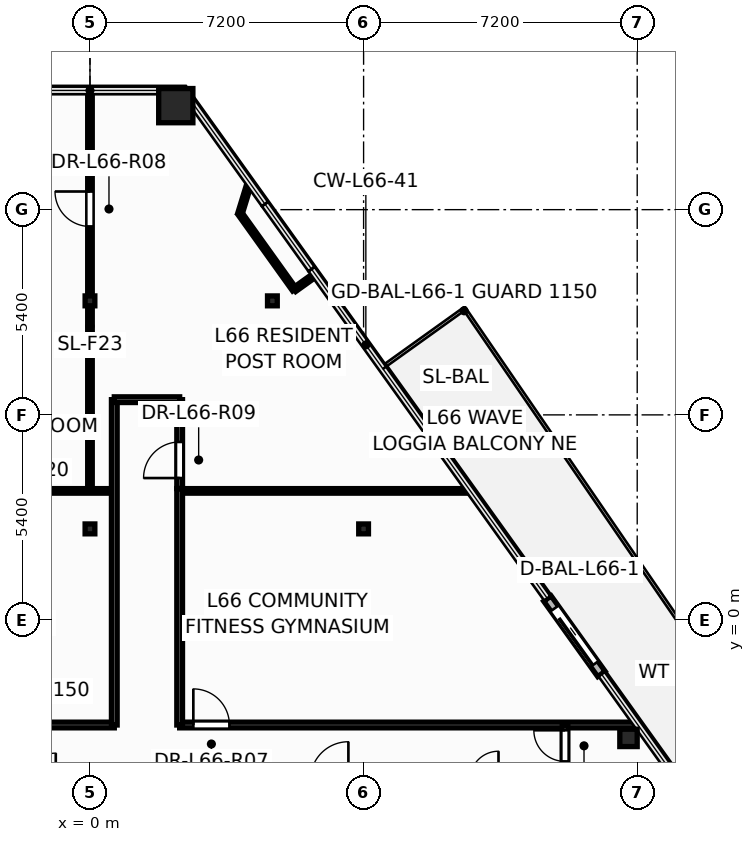
"""IFC4 building model, lengths in metres.
Left out: names, types, materials, properties, quantities, classifications, styles, units other than length and angle.
Written with IfcOpenShell. Run it as: python <this file> out.ifc"""

import sys

from ifc_helpers import new_model, si_unit, direction, frame, frame_2d, origin, origin_2d, place, context, subcontext, project, spatial, rectangle, hollow_rectangle, hollow_circle, i_section, extrude, element, fill, save


model = new_model("IFC4")
c1 = context("Model", 3, precision=1e-05, world=origin(), true_north=direction((0.0, 1.0)))
c2 = subcontext(c1, "Body", "Model", "MODEL_VIEW")
j1 = project(units=[si_unit("LENGTHUNIT", "METRE"), si_unit("PLANEANGLEUNIT", "RADIAN")], contexts=[c1])
p1 = place(None, origin())
s1 = spatial("IfcSite", under=j1, at=p1, CompositionType="ELEMENT")
p2 = place(p1, origin())
s2 = spatial("IfcBuilding", under=s1, at=p2, CompositionType="ELEMENT")
p3 = place(p2, frame((0.0, 0.0, 252.6)))
s3 = spatial("IfcBuildingStorey", under=s2, at=p3, CompositionType="ELEMENT", Elevation=252.6)
p4 = place(p3, frame((2.258, 13.537, 0.0), z_axis=(0.0, 0.0, 1.0), x_axis=(1.0, 0.0, 0.0)))
e1 = element("IfcColumn", 1, at=p4, inside=s3, PredefinedType="COLUMN", context=c2, shape_type="SweptSolid", body=[
    extrude(hollow_rectangle(XDim=0.9, YDim=0.9, WallThickness=0.04, at=origin_2d()), origin(), (0.0, 0.0, 1.0), 3.6),
])
for number, where, z_axis, x_axis in (
    (2, (14.171, -3.099, 0.0), (0.0, 0.0, 1.0), (1.0, 0.0, 0.0)),
    (3, (8.673, 4.579, 0.0), (0.0, 0.0, 1.0), (1.0, 0.0, 0.0)),
):
    element("IfcColumn", number, at=place(p3, frame(where, z_axis=z_axis, x_axis=x_axis)), inside=s3, PredefinedType="COLUMN", context=c2, shape_type="SweptSolid", body=[
        extrude(hollow_circle(Radius=0.229, WallThickness=0.016, at=origin_2d()), origin(), (0.0, 0.0, 1.0), 3.6),
    ])
for number, where, z_axis, x_axis in (
    (4, (0.0, 2.4, 0.0), (0.0, 0.0, 1.0), (1.0, 0.0, 0.0)),
    (5, (7.2, 2.4, 0.0), (0.0, 0.0, 1.0), (1.0, 0.0, 0.0)),
    (6, (0.0, 8.4, 0.0), (0.0, 0.0, 1.0), (1.0, 0.0, 0.0)),
    (7, (4.8, 8.4, 0.0), (0.0, 0.0, 1.0), (1.0, 0.0, 0.0)),
):
    element("IfcColumn", number, at=place(p3, frame(where, z_axis=z_axis, x_axis=x_axis)), inside=s3, PredefinedType="COLUMN", context=c2, shape_type="SweptSolid", body=[
        extrude(i_section(OverallWidth=0.256, OverallDepth=0.26, WebThickness=0.01, FlangeThickness=0.017, at=origin_2d()), origin(), (0.0, 0.0, 1.0), 3.6),
    ])
p5 = place(p3, frame((13.458, -1.417, -0.015), z_axis=(0.0, 0.0, 1.0), x_axis=(-0.582146480264, 0.813083928949, 0.0)))
e8 = element("IfcWall", 8, at=p5, inside=s3, PredefinedType="STANDARD", context=c2, shape_type="SweptSolid", body=[
    extrude(rectangle(XDim=2.44, YDim=0.24, at=frame_2d((1.22, 0.0))), origin(), (0.0, 0.0, 1.0), 2.878),
])
p6 = place(p5, frame((0.32, 0.0, 0.015)))
e9 = element("IfcOpeningElement", 9, at=p6, cuts=e8, PredefinedType="OPENING", context=c2, shape_type="SweptSolid", body=[
    extrude(rectangle(XDim=1.806, YDim=2.204, at=frame_2d((0.9, 1.102))), frame((0.0, 0.13, 0.0), z_axis=(0.0, -1.0, 0.0), x_axis=(1.0, 0.0, 0.0)), (0.0, 0.0, 1.0), 0.26),
])
p7 = place(p3, frame((-14.42, -2.76, 0.0), z_axis=(0.0, 0.0, 1.0), x_axis=(1.0, 0.0, 0.0)))
e10 = element("IfcWall", 10, at=p7, inside=s3, PredefinedType="PARTITIONING", context=c2, shape_type="SweptSolid", body=[
    extrude(rectangle(XDim=15.06, YDim=0.15, at=frame_2d((7.53, 0.0))), origin(), (0.0, 0.0, 1.0), 2.32),
])
p8 = place(p7, frame((3.559, 0.0, 0.0)))
e11 = element("IfcOpeningElement", 11, at=p8, cuts=e10, PredefinedType="OPENING", context=c2, shape_type="SweptSolid", body=[
    extrude(rectangle(XDim=0.956, YDim=2.104, at=frame_2d((0.475, 1.052))), frame((0.0, 0.085, 0.0), z_axis=(0.0, -1.0, 0.0), x_axis=(1.0, 0.0, 0.0)), (0.0, 0.0, 1.0), 0.17),
])
p9 = place(p3, frame((2.36, -2.76, 0.0), z_axis=(0.0, 0.0, 1.0), x_axis=(1.0, 0.0, 0.0)))
e12 = element("IfcWall", 12, at=p9, inside=s3, PredefinedType="PARTITIONING", context=c2, shape_type="SweptSolid", body=[
    extrude(rectangle(XDim=12.06, YDim=0.15, at=frame_2d((6.03, 0.0))), origin(), (0.0, 0.0, 1.0), 2.32),
])
p10 = place(p9, frame((0.36, 0.0, 0.0)))
e13 = element("IfcOpeningElement", 13, at=p10, cuts=e12, PredefinedType="OPENING", context=c2, shape_type="SweptSolid", body=[
    extrude(rectangle(XDim=0.956, YDim=2.104, at=frame_2d((0.475, 1.052))), frame((0.0, 0.085, 0.0), z_axis=(0.0, -1.0, 0.0), x_axis=(1.0, 0.0, 0.0)), (0.0, 0.0, 1.0), 0.17),
])
p11 = place(p3, frame((0.0, 3.4, 0.0), z_axis=(0.0, 0.0, 1.0), x_axis=(0.0, 1.0, 0.0)))
e14 = element("IfcWall", 14, at=p11, inside=s3, PredefinedType="PARTITIONING", context=c2, shape_type="SweptSolid", body=[
    extrude(rectangle(XDim=10.537, YDim=0.12, at=frame_2d((5.269, 0.0))), origin(), (0.0, 0.0, 1.0), 2.32),
])
p12 = place(p11, frame((6.958, 0.0, 0.0)))
e15 = element("IfcOpeningElement", 15, at=p12, cuts=e14, PredefinedType="OPENING", context=c2, shape_type="SweptSolid", body=[
    extrude(rectangle(XDim=0.926, YDim=2.104, at=frame_2d((0.46, 1.052))), frame((0.0, 0.07, 0.0), z_axis=(0.0, -1.0, 0.0), x_axis=(1.0, 0.0, 0.0)), (0.0, 0.0, 1.0), 0.14),
])
p13 = place(p3, frame((-10.009, 3.4, 0.0), z_axis=(0.0, 0.0, 1.0), x_axis=(1.0, 0.0, 0.0)))
e16 = element("IfcWall", 16, at=p13, inside=s3, PredefinedType="PARTITIONING", context=c2, shape_type="SweptSolid", body=[
    extrude(rectangle(XDim=10.649, YDim=0.12, at=frame_2d((5.324, 0.0))), origin(), (0.0, 0.0, 1.0), 2.32),
])
p14 = place(p3, frame((2.36, 3.4, 0.0), z_axis=(0.0, 0.0, 1.0), x_axis=(1.0, 0.0, 0.0)))
e17 = element("IfcWall", 17, at=p14, inside=s3, PredefinedType="PARTITIONING", context=c2, shape_type="SweptSolid", body=[
    extrude(rectangle(XDim=7.649, YDim=0.12, at=frame_2d((3.824, 0.0))), origin(), (0.0, 0.0, 1.0), 2.718),
])
p15 = place(p3, frame((2.36, -2.76, 0.0), z_axis=(0.0, 0.0, 1.0), x_axis=(0.0, 1.0, 0.0)))
e18 = element("IfcWall", 18, at=p15, inside=s3, PredefinedType="PARTITIONING", context=c2, shape_type="SweptSolid", body=[
    extrude(rectangle(XDim=6.22, YDim=0.15, at=frame_2d((3.11, 0.0))), origin(), (0.0, 0.0, 1.0), 2.32),
])
p16 = place(p3, frame((0.64, -2.76, 0.0), z_axis=(0.0, 0.0, 1.0), x_axis=(0.0, 1.0, 0.0)))
e19 = element("IfcWall", 19, at=p16, inside=s3, PredefinedType="PARTITIONING", context=c2, shape_type="SweptSolid", body=[
    extrude(rectangle(XDim=8.56, YDim=0.15, at=frame_2d((4.28, 0.0))), origin(), (0.0, 0.0, 1.0), 2.32),
])
p17 = place(p3, frame((5.381, 8.695, 0.0), z_axis=(0.0, 0.0, 1.0), x_axis=(-0.582269881882, 0.812995562505, 0.0)))
e20 = element("IfcWall", 20, at=p17, inside=s3, PredefinedType="PARTITIONING", context=c2, shape_type="SweptSolid", body=[
    extrude(rectangle(XDim=2.461, YDim=0.12, at=frame_2d((1.23, 0.0))), origin(), (0.0, 0.0, 1.0), 3.345),
])
p18 = place(p3, frame((2.36, 3.462, 0.0), z_axis=(0.0, 0.0, 1.0), x_axis=(0.0, 1.0, 0.0)))
e21 = element("IfcWall", 21, at=p18, inside=s3, PredefinedType="PARTITIONING", context=c2, shape_type="SweptSolid", body=[
    extrude(rectangle(XDim=2.338, YDim=0.15, at=frame_2d((1.169, 0.0))), origin(), (0.0, 0.0, 1.0), 2.964),
])
p19 = place(p18, frame((0.276, 0.0, 0.0)))
e22 = element("IfcOpeningElement", 22, at=p19, cuts=e21, PredefinedType="OPENING", context=c2, shape_type="SweptSolid", body=[
    extrude(rectangle(XDim=0.956, YDim=2.104, at=frame_2d((0.475, 1.052))), frame((0.0, 0.085, 0.0), z_axis=(0.0, -1.0, 0.0), x_axis=(1.0, 0.0, 0.0)), (0.0, 0.0, 1.0), 0.17),
])
p20 = place(p3, frame((0.64, 5.8, 0.0), z_axis=(0.0, 0.0, 1.0), x_axis=(1.0, 0.0, 0.0)))
e23 = element("IfcWall", 23, at=p20, inside=s3, PredefinedType="PARTITIONING", context=c2, shape_type="SweptSolid", body=[
    extrude(rectangle(XDim=1.72, YDim=0.15, at=frame_2d((0.86, 0.0))), origin(), (0.0, 0.0, 1.0), 2.964),
])
p21 = place(p3, frame((12.5, -4.24, 0.0), z_axis=(0.0, 0.0, 1.0), x_axis=(0.0, 1.0, 0.0)))
e24 = element("IfcWall", 24, at=p21, inside=s3, PredefinedType="PARTITIONING", context=c2, shape_type="SweptSolid", body=[
    extrude(rectangle(XDim=1.48, YDim=0.15, at=frame_2d((0.74, 0.0))), origin(), (0.0, 0.0, 1.0), 2.32),
])
p22 = place(p21, frame((0.522, 0.0, 0.0)))
e25 = element("IfcOpeningElement", 25, at=p22, cuts=e24, PredefinedType="OPENING", context=c2, shape_type="SweptSolid", body=[
    extrude(rectangle(XDim=0.826, YDim=2.104, at=frame_2d((0.41, 1.052))), frame((0.0, 0.085, 0.0), z_axis=(0.0, -1.0, 0.0), x_axis=(1.0, 0.0, 0.0)), (0.0, 0.0, 1.0), 0.17),
])
p23 = place(p3, frame((3.948, 10.696, 0.0), z_axis=(0.0, 0.0, 1.0), x_axis=(0.294146941198, 0.955760208935, 0.0)))
e26 = element("IfcWall", 26, at=p23, inside=s3, PredefinedType="PARTITIONING", context=c2, shape_type="SweptSolid", body=[
    extrude(rectangle(XDim=0.843, YDim=0.12, at=frame_2d((0.421, 0.0))), origin(), (0.0, 0.0, 1.0), 2.863),
])
p24 = place(p3, frame((5.925, 9.085, 0.0), z_axis=(0.0, 0.0, 1.0), x_axis=(-0.812969505803, -0.582306261888, 0.0)))
e27 = element("IfcWall", 27, at=p24, inside=s3, PredefinedType="PARTITIONING", context=c2, shape_type="SweptSolid", body=[
    extrude(rectangle(XDim=0.67, YDim=0.12, at=frame_2d((0.335, 0.0))), origin(), (0.0, 0.0, 1.0), 2.863),
])
p25 = place(p6, origin())
e28 = element("IfcDoor", 28, at=p25, inside=s3, OperationType="SLIDING_TO_LEFT", PredefinedType="DOOR", context=c2, shape_type="SweptSolid", body=[
    extrude(rectangle(XDim=1.8, YDim=2.2, at=frame_2d((0.9, 1.1))), frame((0.0, 0.025, 0.0), z_axis=(0.0, -1.0, 0.0), x_axis=(1.0, 0.0, 0.0)), (0.0, 0.0, 1.0), 0.05),
])
fill(e9, e28)
p26 = place(p22, origin())
e29 = element("IfcDoor", 29, at=p26, inside=s3, OperationType="SINGLE_SWING_RIGHT", PredefinedType="DOOR", context=c2, shape_type="SweptSolid", body=[
    extrude(rectangle(XDim=0.82, YDim=2.1, at=frame_2d((0.41, 1.05))), frame((0.0, 0.025, 0.0), z_axis=(0.0, -1.0, 0.0), x_axis=(1.0, 0.0, 0.0)), (0.0, 0.0, 1.0), 0.05),
])
fill(e25, e29)
p27 = place(p10, origin())
e30 = element("IfcDoor", 30, at=p27, inside=s3, OperationType="SINGLE_SWING_LEFT", PredefinedType="DOOR", context=c2, shape_type="SweptSolid", body=[
    extrude(rectangle(XDim=0.95, YDim=2.1, at=frame_2d((0.475, 1.05))), frame((0.0, 0.025, 0.0), z_axis=(0.0, -1.0, 0.0), x_axis=(1.0, 0.0, 0.0)), (0.0, 0.0, 1.0), 0.05),
])
fill(e13, e30)
p28 = place(p12, origin())
e31 = element("IfcDoor", 31, at=p28, inside=s3, OperationType="SINGLE_SWING_RIGHT", PredefinedType="DOOR", context=c2, shape_type="SweptSolid", body=[
    extrude(rectangle(XDim=0.92, YDim=2.1, at=frame_2d((0.46, 1.05))), frame((0.0, 0.025, 0.0), z_axis=(0.0, -1.0, 0.0), x_axis=(1.0, 0.0, 0.0)), (0.0, 0.0, 1.0), 0.05),
])
fill(e15, e31)
p29 = place(p19, origin())
e32 = element("IfcDoor", 32, at=p29, inside=s3, OperationType="SINGLE_SWING_LEFT", PredefinedType="DOOR", context=c2, shape_type="SweptSolid", body=[
    extrude(rectangle(XDim=0.95, YDim=2.1, at=frame_2d((0.475, 1.05))), frame((0.0, 0.025, 0.0), z_axis=(0.0, -1.0, 0.0), x_axis=(1.0, 0.0, 0.0)), (0.0, 0.0, 1.0), 0.05),
])
fill(e22, e32)
save(model, sys.argv[1])
